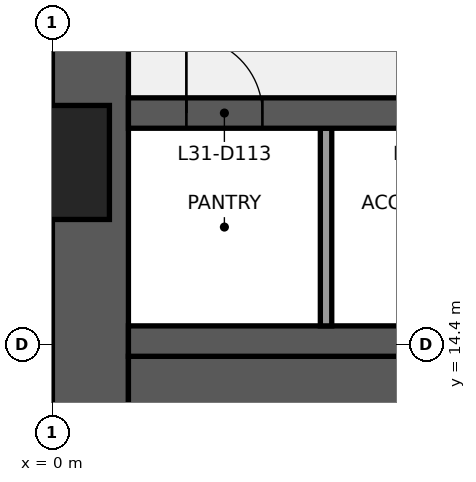
"""IFC4 building model, lengths in metres.
Left out: names, types, materials, properties, quantities, classifications, styles, units other than length and angle.
Written with IfcOpenShell. Run it as: python <this file> out.ifc"""

import sys

from ifc_helpers import new_model, si_unit, direction, frame, frame_2d, origin, place, context, subcontext, project, spatial, rectangle, extrude, element, fill, save


model = new_model("IFC4")
c1 = context("Model", 3, precision=1e-05, world=origin(), true_north=direction((0.0, 1.0)))
c2 = subcontext(c1, "Body", "Model", "MODEL_VIEW")
j1 = project(units=[si_unit("LENGTHUNIT", "METRE"), si_unit("PLANEANGLEUNIT", "RADIAN")], contexts=[c1])
p1 = place(None, origin())
s1 = spatial("IfcSite", under=j1, at=p1, CompositionType="ELEMENT")
p2 = place(p1, origin())
s2 = spatial("IfcBuilding", under=s1, at=p2, CompositionType="ELEMENT")
p3 = place(p2, frame((0.0, 0.0, 144.1)))
s3 = spatial("IfcBuildingStorey", under=s2, at=p3, CompositionType="ELEMENT", Elevation=144.1)
p4 = place(p3, frame((0.5, 9.6, 0.0), z_axis=(0.0, 0.0, 1.0), x_axis=(0.0, 1.0, 0.0)))
e1 = element("IfcWall", 1, at=p4, inside=s3, PredefinedType="SHEAR", context=c2, shape_type="SweptSolid", body=[
    extrude(rectangle(XDim=28.8, YDim=1.0, at=frame_2d((14.4, 0.0))), origin(), (0.0, 0.0, 1.0), 3.84),
])
p5 = place(p4, frame((8.85, 0.0, 0.9)))
e2 = element("IfcOpeningElement", 2, at=p5, cuts=e1, PredefinedType="OPENING", context=c2, shape_type="SweptSolid", body=[
    extrude(rectangle(XDim=1.5, YDim=1.5, at=frame_2d((0.75, 0.75))), frame((0.0, 0.51, 0.0), z_axis=(0.0, -1.0, 0.0), x_axis=(1.0, 0.0, 0.0)), (0.0, 0.0, 1.0), 1.02),
])
p6 = place(p4, frame((18.45, 0.0, 0.9)))
e3 = element("IfcOpeningElement", 3, at=p6, cuts=e1, PredefinedType="OPENING", context=c2, shape_type="SweptSolid", body=[
    extrude(rectangle(XDim=1.5, YDim=1.5, at=frame_2d((0.75, 0.75))), frame((0.0, 0.51, 0.0), z_axis=(0.0, -1.0, 0.0), x_axis=(1.0, 0.0, 0.0)), (0.0, 0.0, 1.0), 1.02),
])
p7 = place(p3, frame((1.0, 12.425, 0.0), z_axis=(0.0, 0.0, 1.0), x_axis=(1.0, 0.0, 0.0)))
e4 = element("IfcWall", 4, at=p7, inside=s3, PredefinedType="SHEAR", context=c2, shape_type="SweptSolid", body=[
    extrude(rectangle(XDim=5.25, YDim=3.65, at=frame_2d((2.625, 0.0))), origin(), (0.0, 0.0, 1.0), 3.84),
])
p8 = place(p3, frame((1.0, 14.45, 0.0), z_axis=(0.0, 0.0, 1.0), x_axis=(1.0, 0.0, 0.0)))
e5 = element("IfcWall", 5, at=p8, inside=s3, PredefinedType="SHEAR", context=c2, shape_type="SweptSolid", body=[
    extrude(rectangle(XDim=17.2, YDim=0.4, at=frame_2d((8.6, 0.0))), origin(), (0.0, 0.0, 1.0), 3.84),
])
p9 = place(p3, frame((3.6, 14.65, 0.0), z_axis=(0.0, 0.0, 1.0), x_axis=(0.0, 1.0, 0.0)))
e6 = element("IfcWall", 6, at=p9, inside=s3, PredefinedType="PARTITIONING", context=c2, shape_type="SweptSolid", body=[
    extrude(rectangle(XDim=2.6, YDim=0.15, at=frame_2d((1.3, 0.0))), origin(), (0.0, 0.0, 1.0), 3.84),
])
p10 = place(p3, frame((1.0, 17.45, 0.0), z_axis=(0.0, 0.0, 1.0), x_axis=(1.0, 0.0, 0.0)))
e7 = element("IfcWall", 7, at=p10, inside=s3, PredefinedType="SHEAR", context=c2, shape_type="SweptSolid", body=[
    extrude(rectangle(XDim=17.2, YDim=0.4, at=frame_2d((8.6, 0.0))), origin(), (0.0, 0.0, 1.0), 3.84),
])
p11 = place(p10, frame((0.762, 0.0, 0.0)))
e8 = element("IfcOpeningElement", 8, at=p11, cuts=e7, PredefinedType="OPENING", context=c2, shape_type="SweptSolid", body=[
    extrude(rectangle(XDim=1.0, YDim=2.1, at=frame_2d((0.5, 1.05))), frame((0.0, 0.21, 0.0), z_axis=(0.0, -1.0, 0.0), x_axis=(1.0, 0.0, 0.0)), (0.0, 0.0, 1.0), 0.42),
])
p12 = place(p10, frame((3.6, 0.0, 0.0)))
e9 = element("IfcOpeningElement", 9, at=p12, cuts=e7, PredefinedType="OPENING", context=c2, shape_type="SweptSolid", body=[
    extrude(rectangle(XDim=1.0, YDim=2.1, at=frame_2d((0.5, 1.05))), frame((0.0, 0.21, 0.0), z_axis=(0.0, -1.0, 0.0), x_axis=(1.0, 0.0, 0.0)), (0.0, 0.0, 1.0), 0.42),
])
p13 = place(p10, frame((6.6, 0.0, 0.0)))
e10 = element("IfcOpeningElement", 10, at=p13, cuts=e7, PredefinedType="OPENING", context=c2, shape_type="SweptSolid", body=[
    extrude(rectangle(XDim=1.0, YDim=2.1, at=frame_2d((0.5, 1.05))), frame((0.0, 0.21, 0.0), z_axis=(0.0, -1.0, 0.0), x_axis=(1.0, 0.0, 0.0)), (0.0, 0.0, 1.0), 0.42),
])
p14 = place(p10, frame((10.2, 0.0, 0.0)))
e11 = element("IfcOpeningElement", 11, at=p14, cuts=e7, PredefinedType="OPENING", context=c2, shape_type="SweptSolid", body=[
    extrude(rectangle(XDim=1.0, YDim=2.1, at=frame_2d((0.5, 1.05))), frame((0.0, 0.21, 0.0), z_axis=(0.0, -1.0, 0.0), x_axis=(1.0, 0.0, 0.0)), (0.0, 0.0, 1.0), 0.42),
])
p15 = place(p10, frame((14.538, 0.0, 0.0)))
e12 = element("IfcOpeningElement", 12, at=p15, cuts=e7, PredefinedType="OPENING", context=c2, shape_type="SweptSolid", body=[
    extrude(rectangle(XDim=1.0, YDim=2.1, at=frame_2d((0.5, 1.05))), frame((0.0, 0.21, 0.0), z_axis=(0.0, -1.0, 0.0), x_axis=(1.0, 0.0, 0.0)), (0.0, 0.0, 1.0), 0.42),
])
p16 = place(p11, origin())
e13 = element("IfcDoor", 13, at=p16, inside=s3, OperationType="SINGLE_SWING_LEFT", PredefinedType="DOOR", context=c2, shape_type="SweptSolid", body=[
    extrude(rectangle(XDim=1.0, YDim=2.1, at=frame_2d((0.5, 1.05))), frame((0.0, 0.025, 0.0), z_axis=(0.0, -1.0, 0.0), x_axis=(1.0, 0.0, 0.0)), (0.0, 0.0, 1.0), 0.05),
])
fill(e8, e13)
save(model, sys.argv[1])
